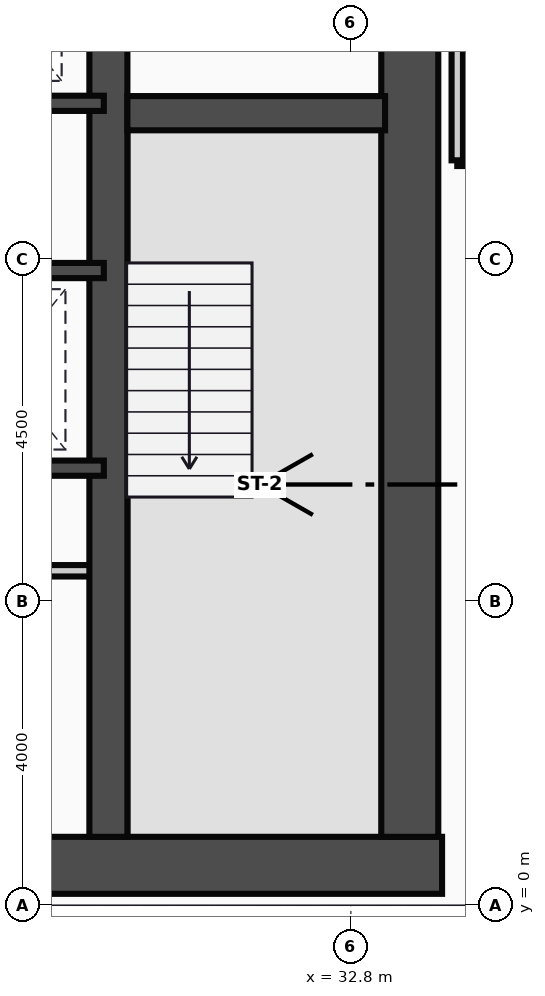
"""IFC4 building model, lengths in metres.
Left out: names, types, materials, properties, quantities, classifications, styles, units other than length and angle.
Written with IfcOpenShell. Run it as: python <this file> out.ifc"""

import sys

from ifc_helpers import new_model, si_unit, direction, frame, frame_2d, origin, place, context, subcontext, project, spatial, rectangle, extrude, source, transform, mapped, element, fill, save


model = new_model("IFC4")
c1 = context("Model", 3, precision=1e-05, world=origin(), true_north=direction((0.0, 1.0)))
c2 = subcontext(c1, "Body", "Model", "MODEL_VIEW")
j1 = project(units=[si_unit("LENGTHUNIT", "METRE"), si_unit("PLANEANGLEUNIT", "RADIAN")], contexts=[c1])
p1 = place(None, origin())
s1 = spatial("IfcSite", under=j1, at=p1, CompositionType="ELEMENT")
p2 = place(p1, origin())
s2 = spatial("IfcBuilding", under=s1, at=p2, CompositionType="ELEMENT")
p3 = place(p2, frame((0.0, 0.0, 184.4)))
s3 = spatial("IfcBuildingStorey", under=s2, at=p3, CompositionType="ELEMENT", Elevation=184.4)
m1 = source(origin(), c2, "Body", "SweptSolid", [
    extrude(rectangle(XDim=29.5, YDim=0.75, at=frame_2d((14.75, 0.0))), origin(), (0.0, 0.0, 1.0), 4.2),
])
p4 = place(p3, frame((4.5, 0.525, 0.0), z_axis=(0.0, 0.0, 1.0), x_axis=(1.0, 0.0, 0.0)))
e1 = element("IfcWall", 1, at=p4, inside=s3, PredefinedType="SHEAR", context=c2, shape_type="MappedRepresentation", body=[
    mapped(m1, transform((0.0, 0.0, 0.0))),
])
m2 = source(origin(), c2, "Body", "SweptSolid", [
    extrude(rectangle(XDim=13.1, YDim=0.75, at=frame_2d((6.55, 0.0))), origin(), (0.0, 0.0, 1.0), 4.2),
])
p5 = place(p3, frame((33.575, 0.9, 0.0), z_axis=(0.0, 0.0, 1.0), x_axis=(0.0, 1.0, 0.0)))
e2 = element("IfcWall", 2, at=p5, inside=s3, PredefinedType="SHEAR", context=c2, shape_type="MappedRepresentation", body=[
    mapped(m2, transform((0.0, 0.0, 0.0))),
])
m3 = source(origin(), c2, "Body", "SweptSolid", [
    extrude(rectangle(XDim=12.35, YDim=0.5, at=frame_2d((6.175, 0.0))), origin(), (0.0, 0.0, 1.0), 4.2),
])
p6 = place(p3, frame((29.61, 0.9, 0.0), z_axis=(0.0, 0.0, 1.0), x_axis=(0.0, 1.0, 0.0)))
e3 = element("IfcWall", 3, at=p6, inside=s3, PredefinedType="SHEAR", context=c2, shape_type="MappedRepresentation", body=[
    mapped(m3, transform((0.0, 0.0, 0.0))),
])
m4 = source(origin(), c2, "Body", "SweptSolid", [
    extrude(rectangle(XDim=3.39, YDim=0.45, at=frame_2d((1.695, 0.0))), origin(), (0.0, 0.0, 1.0), 4.2),
])
p7 = place(p3, frame((29.86, 10.42, 0.0), z_axis=(0.0, 0.0, 1.0), x_axis=(1.0, 0.0, 0.0)))
e4 = element("IfcWall", 4, at=p7, inside=s3, PredefinedType="SHEAR", context=c2, shape_type="MappedRepresentation", body=[
    mapped(m4, transform((0.0, 0.0, 0.0))),
])
p8 = place(p7, frame((1.1, 0.0, 0.0)))
e5 = element("IfcOpeningElement", 5, at=p8, cuts=e4, PredefinedType="OPENING", context=c2, shape_type="SweptSolid", body=[
    extrude(rectangle(XDim=1.1, YDim=2.15, at=frame_2d((0.55, 1.075))), frame((0.0, 0.235, 0.0), z_axis=(0.0, -1.0, 0.0), x_axis=(1.0, 0.0, 0.0)), (0.0, 0.0, 1.0), 0.47),
])
m5 = source(origin(), c2, "Body", "SweptSolid", [
    extrude(rectangle(XDim=8.8, YDim=0.2, at=frame_2d((4.4, 0.0))), origin(), (0.0, 0.0, 1.0), 3.95),
])
p9 = place(p3, frame((20.75, 10.55, 0.0), z_axis=(0.0, 0.0, 1.0), x_axis=(1.0, 0.0, 0.0)))
e6 = element("IfcWall", 6, at=p9, inside=s3, PredefinedType="PARTITIONING", context=c2, shape_type="MappedRepresentation", body=[
    mapped(m5, transform((0.0, 0.0, 0.0))),
])
p10 = place(p9, frame((0.5, 0.0, 0.0)))
e7 = element("IfcOpeningElement", 7, at=p10, cuts=e6, PredefinedType="OPENING", context=c2, shape_type="SweptSolid", body=[
    extrude(rectangle(XDim=1.05, YDim=2.15, at=frame_2d((0.525, 1.075))), frame((0.0, 0.11, 0.0), z_axis=(0.0, -1.0, 0.0), x_axis=(1.0, 0.0, 0.0)), (0.0, 0.0, 1.0), 0.22),
])
p11 = place(p9, frame((2.6, 0.0, 0.0)))
e8 = element("IfcOpeningElement", 8, at=p11, cuts=e6, PredefinedType="OPENING", context=c2, shape_type="SweptSolid", body=[
    extrude(rectangle(XDim=1.05, YDim=2.15, at=frame_2d((0.525, 1.075))), frame((0.0, 0.11, 0.0), z_axis=(0.0, -1.0, 0.0), x_axis=(1.0, 0.0, 0.0)), (0.0, 0.0, 1.0), 0.22),
])
p12 = place(p9, frame((4.7, 0.0, 0.0)))
e9 = element("IfcOpeningElement", 9, at=p12, cuts=e6, PredefinedType="OPENING", context=c2, shape_type="SweptSolid", body=[
    extrude(rectangle(XDim=1.05, YDim=2.15, at=frame_2d((0.525, 1.075))), frame((0.0, 0.11, 0.0), z_axis=(0.0, -1.0, 0.0), x_axis=(1.0, 0.0, 0.0)), (0.0, 0.0, 1.0), 0.22),
])
p13 = place(p9, frame((6.8, 0.0, 0.0)))
e10 = element("IfcOpeningElement", 10, at=p13, cuts=e6, PredefinedType="OPENING", context=c2, shape_type="SweptSolid", body=[
    extrude(rectangle(XDim=1.05, YDim=2.15, at=frame_2d((0.525, 1.075))), frame((0.0, 0.11, 0.0), z_axis=(0.0, -1.0, 0.0), x_axis=(1.0, 0.0, 0.0)), (0.0, 0.0, 1.0), 0.22),
])
m6 = source(origin(), c2, "Body", "SweptSolid", [
    extrude(rectangle(XDim=4.55, YDim=0.2, at=frame_2d((2.275, 0.0))), origin(), (0.0, 0.0, 1.0), 3.95),
])
p14 = place(p3, frame((25.0, 8.35, 0.0), z_axis=(0.0, 0.0, 1.0), x_axis=(1.0, 0.0, 0.0)))
e11 = element("IfcWall", 11, at=p14, inside=s3, PredefinedType="PARTITIONING", context=c2, shape_type="MappedRepresentation", body=[
    mapped(m6, transform((0.0, 0.0, 0.0))),
])
p15 = place(p14, frame((0.5, 0.0, 0.0)))
e12 = element("IfcOpeningElement", 12, at=p15, cuts=e11, PredefinedType="OPENING", context=c2, shape_type="SweptSolid", body=[
    extrude(rectangle(XDim=1.05, YDim=2.15, at=frame_2d((0.525, 1.075))), frame((0.0, 0.11, 0.0), z_axis=(0.0, -1.0, 0.0), x_axis=(1.0, 0.0, 0.0)), (0.0, 0.0, 1.0), 0.22),
])
p16 = place(p14, frame((2.6, 0.0, 0.0)))
e13 = element("IfcOpeningElement", 13, at=p16, cuts=e11, PredefinedType="OPENING", context=c2, shape_type="SweptSolid", body=[
    extrude(rectangle(XDim=1.05, YDim=2.15, at=frame_2d((0.525, 1.075))), frame((0.0, 0.11, 0.0), z_axis=(0.0, -1.0, 0.0), x_axis=(1.0, 0.0, 0.0)), (0.0, 0.0, 1.0), 0.22),
])
p17 = place(p3, frame((25.0, 5.75, 0.0), z_axis=(0.0, 0.0, 1.0), x_axis=(1.0, 0.0, 0.0)))
e14 = element("IfcWall", 14, at=p17, inside=s3, PredefinedType="PARTITIONING", context=c2, shape_type="MappedRepresentation", body=[
    mapped(m6, transform((0.0, 0.0, 0.0))),
])
m7 = source(origin(), c2, "Body", "SweptSolid", [
    extrude(rectangle(XDim=4.55, YDim=0.15, at=frame_2d((2.275, 0.0))), origin(), (0.0, 0.0, 1.0), 3.95),
])
p18 = place(p3, frame((25.0, 4.4, 0.0), z_axis=(0.0, 0.0, 1.0), x_axis=(1.0, 0.0, 0.0)))
e15 = element("IfcWall", 15, at=p18, inside=s3, PredefinedType="PARTITIONING", context=c2, shape_type="MappedRepresentation", body=[
    mapped(m7, transform((0.0, 0.0, 0.0))),
])
m8 = source(origin(), c2, "Body", "SweptSolid", [
    extrude(rectangle(XDim=4.8, YDim=0.15, at=frame_2d((2.4, 0.0))), origin(), (0.0, 0.0, 1.0), 3.95),
])
p19 = place(p3, frame((34.2, 9.8, 0.0), z_axis=(0.0, 0.0, 1.0), x_axis=(1.0, 0.0, 0.0)))
e16 = element("IfcWall", 16, at=p19, inside=s3, PredefinedType="PARTITIONING", context=c2, shape_type="MappedRepresentation", body=[
    mapped(m8, transform((0.0, 0.0, 0.0))),
])
m9 = source(origin(), c2, "Body", "SweptSolid", [
    extrude(rectangle(XDim=4.18, YDim=0.15, at=frame_2d((2.09, 0.0))), origin(), (0.0, 0.0, 1.0), 3.95),
])
p20 = place(p3, frame((34.2, 9.8, 0.0), z_axis=(0.0, 0.0, 1.0), x_axis=(0.0, 1.0, 0.0)))
e17 = element("IfcWall", 17, at=p20, inside=s3, PredefinedType="PARTITIONING", context=c2, shape_type="MappedRepresentation", body=[
    mapped(m9, transform((0.0, 0.0, 0.0))),
])
m10 = source(origin(), c2, "Body", "SweptSolid", [
    extrude(rectangle(XDim=1.1, YDim=2.15, at=frame_2d((0.55, 1.075))), frame((0.0, 0.025, 0.0), z_axis=(0.0, -1.0, 0.0), x_axis=(1.0, 0.0, 0.0)), (0.0, 0.0, 1.0), 0.05),
])
p21 = place(p8, frame((1.1, 0.0, 0.0), z_axis=(0.0, 0.0, 1.0), x_axis=(-1.0, 0.0, 0.0)))
e18 = element("IfcDoor", 18, at=p21, inside=s3, OperationType="SINGLE_SWING_RIGHT", PredefinedType="DOOR", context=c2, shape_type="MappedRepresentation", body=[
    mapped(m10, transform((0.0, 0.0, 0.0))),
])
fill(e5, e18)
save(model, sys.argv[1])
